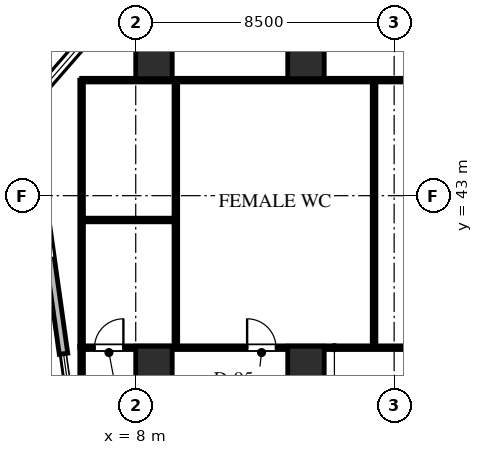
"""IFC4 building model, lengths in metres.
Left out: names, types, materials, properties, quantities, classifications, styles, units other than length and angle.
Written with IfcOpenShell. Run it as: python <this file> out.ifc"""

import sys

from ifc_helpers import new_model, si_unit, direction, frame, frame_2d, origin, origin_2d, place, context, subcontext, project, spatial, rectangle, extrude, element, fill, save


model = new_model("IFC4")
c1 = context("Model", 3, precision=1e-05, world=origin(), true_north=direction((0.0, 1.0)))
c2 = subcontext(c1, "Body", "Model", "MODEL_VIEW")
j1 = project(units=[si_unit("LENGTHUNIT", "METRE"), si_unit("PLANEANGLEUNIT", "RADIAN")], contexts=[c1])
p1 = place(None, origin())
s1 = spatial("IfcSite", under=j1, at=p1, CompositionType="ELEMENT")
p2 = place(p1, origin())
s2 = spatial("IfcBuilding", under=s1, at=p2, CompositionType="ELEMENT")
p3 = place(p2, frame((0.0, 0.0, 61.5)))
s3 = spatial("IfcBuildingStorey", under=s2, at=p3, CompositionType="ELEMENT", Elevation=61.5)
for number, where, z_axis, x_axis in (
    (1, (13.6, 37.35, 0.0), (0.0, 0.0, 1.0), (1.0, 0.0, 0.0)),
    (2, (13.6, 47.55, 0.0), (0.0, 0.0, 1.0), (1.0, 0.0, 0.0)),
    (3, (8.6, 37.35, 0.0), (0.0, 0.0, 1.0), (1.0, 0.0, 0.0)),
    (4, (8.6, 47.55, 0.0), (0.0, 0.0, 1.0), (1.0, 0.0, 0.0)),
):
    element("IfcColumn", number, at=place(p3, frame(where, z_axis=z_axis, x_axis=x_axis)), inside=s3, PredefinedType="COLUMN", context=c2, shape_type="SweptSolid", body=[
        extrude(rectangle(XDim=1.2, YDim=1.4, at=origin_2d()), origin(), (0.0, 0.0, 1.0), 4.0),
    ])
p4 = place(p3, frame((5.625, 37.8, 0.0), z_axis=(0.0, 0.0, 1.0), x_axis=(-0.139180172484, 0.990267074878, 0.0)))
e5 = element("IfcWall", 5, at=p4, inside=s3, PredefinedType="STANDARD", context=c2, shape_type="SweptSolid", body=[
    extrude(rectangle(XDim=8.267, YDim=0.28, at=frame_2d((4.134, 0.0))), origin(), (0.0, 0.0, 1.0), 3.74),
])
p5 = place(p4, frame((3.173, 0.0, 0.65)))
e6 = element("IfcOpeningElement", 6, at=p5, cuts=e5, PredefinedType="OPENING", context=c2, shape_type="SweptSolid", body=[
    extrude(rectangle(XDim=1.8, YDim=2.1, at=frame_2d((0.9, 1.05))), frame((0.0, 0.15, 0.0), z_axis=(0.0, -1.0, 0.0), x_axis=(1.0, 0.0, 0.0)), (0.0, 0.0, 1.0), 0.3),
])
p6 = place(p3, frame((4.474, 45.987, 0.0), z_axis=(0.0, 0.0, 1.0), x_axis=(0.656070053895, 0.754699996278, 0.0)))
e7 = element("IfcWall", 7, at=p6, inside=s3, PredefinedType="STANDARD", context=c2, shape_type="SweptSolid", body=[
    extrude(rectangle(XDim=3.171, YDim=0.28, at=frame_2d((1.585, 0.0))), origin(), (0.0, 0.0, 1.0), 3.74),
])
p7 = place(p6, frame((0.667, 0.0, 0.65)))
e8 = element("IfcOpeningElement", 8, at=p7, cuts=e7, PredefinedType="OPENING", context=c2, shape_type="SweptSolid", body=[
    extrude(rectangle(XDim=1.8, YDim=2.1, at=frame_2d((0.9, 1.05))), frame((0.0, 0.15, 0.0), z_axis=(0.0, -1.0, 0.0), x_axis=(1.0, 0.0, 0.0)), (0.0, 0.0, 1.0), 0.3),
])
p8 = place(p3, frame((6.22, 38.0, 0.0), z_axis=(0.0, 0.0, 1.0), x_axis=(1.0, 0.0, 0.0)))
e9 = element("IfcWall", 9, at=p8, inside=s3, PredefinedType="PARTITIONING", context=c2, shape_type="SweptSolid", body=[
    extrude(rectangle(XDim=16.63, YDim=0.12, at=frame_2d((8.315, 0.0))), origin(), (0.0, 0.0, 1.0), 2.813),
])
p9 = place(p8, frame((0.424, 0.0, 0.0)))
e10 = element("IfcOpeningElement", 10, at=p9, cuts=e9, PredefinedType="OPENING", context=c2, shape_type="SweptSolid", body=[
    extrude(rectangle(XDim=0.95, YDim=2.15, at=frame_2d((0.475, 1.075))), frame((0.0, 0.07, 0.0), z_axis=(0.0, -1.0, 0.0), x_axis=(1.0, 0.0, 0.0)), (0.0, 0.0, 1.0), 0.14),
])
p10 = place(p8, frame((5.444, 0.0, 0.0)))
e11 = element("IfcOpeningElement", 11, at=p10, cuts=e9, PredefinedType="OPENING", context=c2, shape_type="SweptSolid", body=[
    extrude(rectangle(XDim=0.95, YDim=2.15, at=frame_2d((0.475, 1.075))), frame((0.0, 0.07, 0.0), z_axis=(0.0, -1.0, 0.0), x_axis=(1.0, 0.0, 0.0)), (0.0, 0.0, 1.0), 0.14),
])
p11 = place(p8, frame((13.344, 0.0, 0.0)))
e12 = element("IfcOpeningElement", 12, at=p11, cuts=e9, PredefinedType="OPENING", context=c2, shape_type="SweptSolid", body=[
    extrude(rectangle(XDim=0.95, YDim=2.15, at=frame_2d((0.475, 1.075))), frame((0.0, 0.07, 0.0), z_axis=(0.0, -1.0, 0.0), x_axis=(1.0, 0.0, 0.0)), (0.0, 0.0, 1.0), 0.14),
])
p12 = place(p3, frame((6.22, 38.0, 0.0), z_axis=(0.0, 0.0, 1.0), x_axis=(0.0, 1.0, 0.0)))
e13 = element("IfcWall", 13, at=p12, inside=s3, PredefinedType="PARTITIONING", context=c2, shape_type="SweptSolid", body=[
    extrude(rectangle(XDim=8.8, YDim=0.12, at=frame_2d((4.4, 0.0))), origin(), (0.0, 0.0, 1.0), 3.74),
])
p13 = place(p3, frame((6.22, 46.8, 0.0), z_axis=(0.0, 0.0, 1.0), x_axis=(1.0, 0.0, 0.0)))
e14 = element("IfcWall", 14, at=p13, inside=s3, PredefinedType="PARTITIONING", context=c2, shape_type="SweptSolid", body=[
    extrude(rectangle(XDim=16.68, YDim=0.12, at=frame_2d((8.34, 0.0))), origin(), (0.0, 0.0, 1.0), 2.813),
])
for number, where, z_axis, x_axis in (
    (15, (9.32, 38.068, 0.0), (0.0, 0.0, 1.0), (0.0, 1.0, 0.0)),
    (16, (15.84, 38.068, 0.0), (0.0, 0.0, 1.0), (0.0, 1.0, 0.0)),
):
    element("IfcWall", number, at=place(p3, frame(where, z_axis=z_axis, x_axis=x_axis)), inside=s3, PredefinedType="PARTITIONING", context=c2, shape_type="SweptSolid", body=[
        extrude(rectangle(XDim=8.664, YDim=0.12, at=frame_2d((4.332, 0.0))), origin(), (0.0, 0.0, 1.0), 3.74),
    ])
p14 = place(p3, frame((6.288, 42.2, 0.0), z_axis=(0.0, 0.0, 1.0), x_axis=(1.0, 0.0, 0.0)))
e17 = element("IfcWall", 17, at=p14, inside=s3, PredefinedType="PARTITIONING", context=c2, shape_type="SweptSolid", body=[
    extrude(rectangle(XDim=2.964, YDim=0.12, at=frame_2d((1.482, 0.0))), origin(), (0.0, 0.0, 1.0), 2.813),
])
p15 = place(p3, frame((6.22, 34.4, 0.0), z_axis=(0.0, 0.0, 1.0), x_axis=(0.0, 1.0, 0.0)))
e18 = element("IfcWall", 18, at=p15, inside=s3, PredefinedType="PARTITIONING", context=c2, shape_type="SweptSolid", body=[
    extrude(rectangle(XDim=3.65, YDim=0.12, at=frame_2d((1.825, 0.0))), origin(), (0.0, 0.0, 1.0), 3.74),
])
p16 = place(p7, origin())
e19 = element("IfcWindow", 19, at=p16, inside=s3, PartitioningType="SINGLE_PANEL", PredefinedType="WINDOW", context=c2, shape_type="SweptSolid", body=[
    extrude(rectangle(XDim=1.8, YDim=2.1, at=frame_2d((0.9, 1.05))), frame((0.0, 0.03, 0.0), z_axis=(0.0, -1.0, 0.0), x_axis=(1.0, 0.0, 0.0)), (0.0, 0.0, 1.0), 0.06),
])
fill(e8, e19)
p17 = place(p9, origin())
e20 = element("IfcDoor", 20, at=p17, inside=s3, OperationType="SINGLE_SWING_RIGHT", PredefinedType="DOOR", context=c2, shape_type="SweptSolid", body=[
    extrude(rectangle(XDim=0.95, YDim=2.15, at=frame_2d((0.475, 1.075))), frame((0.0, 0.025, 0.0), z_axis=(0.0, -1.0, 0.0), x_axis=(1.0, 0.0, 0.0)), (0.0, 0.0, 1.0), 0.05),
])
fill(e10, e20)
p18 = place(p10, origin())
e21 = element("IfcDoor", 21, at=p18, inside=s3, OperationType="SINGLE_SWING_LEFT", PredefinedType="DOOR", context=c2, shape_type="SweptSolid", body=[
    extrude(rectangle(XDim=0.95, YDim=2.15, at=frame_2d((0.475, 1.075))), frame((0.0, 0.025, 0.0), z_axis=(0.0, -1.0, 0.0), x_axis=(1.0, 0.0, 0.0)), (0.0, 0.0, 1.0), 0.05),
])
fill(e11, e21)
save(model, sys.argv[1])
